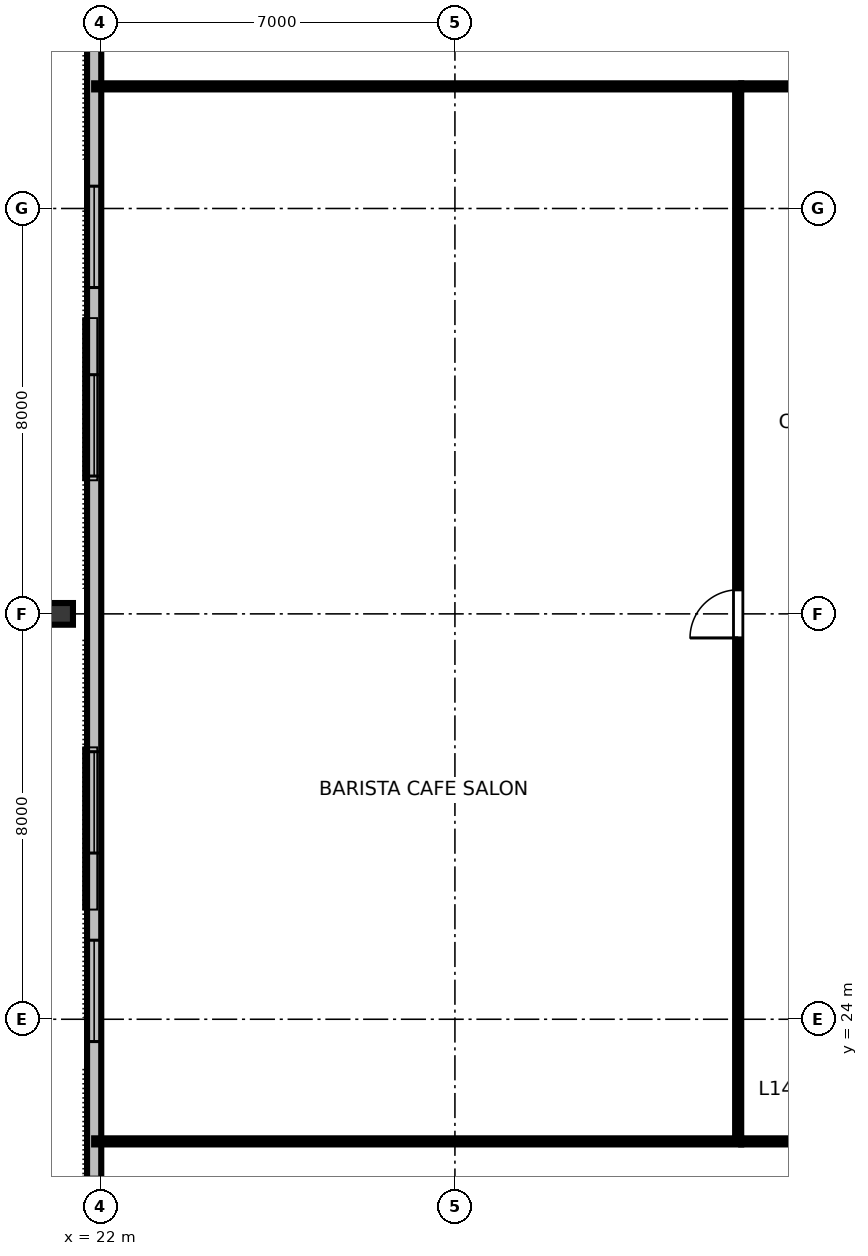
"""IFC4 building model, lengths in metres.
Left out: names, types, materials, properties, quantities, classifications, styles, units other than length and angle.
Written with IfcOpenShell. Run it as: python <this file> out.ifc"""

import sys

from ifc_helpers import new_model, si_unit, direction, frame, frame_2d, origin, origin_2d, place, context, subcontext, project, spatial, rectangle, i_section, extrude, element, fill, save


model = new_model("IFC4")
c1 = context("Model", 3, precision=1e-05, world=origin(), true_north=direction((0.0, 1.0)))
c2 = subcontext(c1, "Body", "Model", "MODEL_VIEW")
j1 = project(units=[si_unit("LENGTHUNIT", "METRE"), si_unit("PLANEANGLEUNIT", "RADIAN")], contexts=[c1])
p1 = place(None, origin())
s1 = spatial("IfcSite", under=j1, at=p1, CompositionType="ELEMENT")
p2 = place(p1, origin())
s2 = spatial("IfcBuilding", under=s1, at=p2, CompositionType="ELEMENT")
p3 = place(p2, frame((0.0, 0.0, 56.8)))
s3 = spatial("IfcBuildingStorey", under=s2, at=p3, CompositionType="ELEMENT", Elevation=56.8)
p4 = place(p3, frame((21.22, 32.0, 0.0), z_axis=(-0.103626949617, 0.0, 0.994616235195), x_axis=(0.994616235195, 0.0, 0.103626949617)))
e1 = element("IfcColumn", 1, at=p4, inside=s3, PredefinedType="COLUMN", context=c2, shape_type="SweptSolid", body=[
    extrude(i_section(OverallWidth=0.428, OverallDepth=0.483, WebThickness=0.051, FlangeThickness=0.082, FilletRadius=0.025, at=origin_2d()), origin(), (0.0, 0.0, 1.0), 3.376),
])
p5 = place(p3, frame((21.88, 49.84, 0.0), z_axis=(0.0, 0.0, 1.0), x_axis=(0.0, -1.0, 0.0)))
e2 = element("IfcWall", 2, at=p5, inside=s3, PredefinedType="STANDARD", context=c2, shape_type="SweptSolid", body=[
    extrude(rectangle(XDim=35.68, YDim=0.28, at=frame_2d((17.84, 0.0))), origin(), (0.0, 0.0, 1.0), 3.36),
])
p6 = place(p5, frame((1.96, 0.0, 0.8)))
e3 = element("IfcOpeningElement", 3, at=p6, cuts=e2, PredefinedType="OPENING", context=c2, shape_type="SweptSolid", body=[
    extrude(rectangle(XDim=2.0, YDim=1.95, at=frame_2d((1.0, 0.975))), frame((0.0, 0.15, 0.0), z_axis=(0.0, -1.0, 0.0), x_axis=(1.0, 0.0, 0.0)), (0.0, 0.0, 1.0), 0.3),
])
p7 = place(p5, frame((9.4, 0.0, 0.8)))
e4 = element("IfcOpeningElement", 4, at=p7, cuts=e2, PredefinedType="OPENING", context=c2, shape_type="SweptSolid", body=[
    extrude(rectangle(XDim=2.0, YDim=1.95, at=frame_2d((1.0, 0.975))), frame((0.0, 0.15, 0.0), z_axis=(0.0, -1.0, 0.0), x_axis=(1.0, 0.0, 0.0)), (0.0, 0.0, 1.0), 0.3),
])
p8 = place(p5, frame((13.12, 0.0, 0.8)))
e5 = element("IfcOpeningElement", 5, at=p8, cuts=e2, PredefinedType="OPENING", context=c2, shape_type="SweptSolid", body=[
    extrude(rectangle(XDim=2.0, YDim=1.95, at=frame_2d((1.0, 0.975))), frame((0.0, 0.15, 0.0), z_axis=(0.0, -1.0, 0.0), x_axis=(1.0, 0.0, 0.0)), (0.0, 0.0, 1.0), 0.3),
])
p9 = place(p5, frame((20.56, 0.0, 0.8)))
e6 = element("IfcOpeningElement", 6, at=p9, cuts=e2, PredefinedType="OPENING", context=c2, shape_type="SweptSolid", body=[
    extrude(rectangle(XDim=2.0, YDim=1.95, at=frame_2d((1.0, 0.975))), frame((0.0, 0.15, 0.0), z_axis=(0.0, -1.0, 0.0), x_axis=(1.0, 0.0, 0.0)), (0.0, 0.0, 1.0), 0.3),
])
p10 = place(p5, frame((24.28, 0.0, 0.8)))
e7 = element("IfcOpeningElement", 7, at=p10, cuts=e2, PredefinedType="OPENING", context=c2, shape_type="SweptSolid", body=[
    extrude(rectangle(XDim=2.0, YDim=1.95, at=frame_2d((1.0, 0.975))), frame((0.0, 0.15, 0.0), z_axis=(0.0, -1.0, 0.0), x_axis=(1.0, 0.0, 0.0)), (0.0, 0.0, 1.0), 0.3),
])
p11 = place(p5, frame((31.72, 0.0, 0.8)))
e8 = element("IfcOpeningElement", 8, at=p11, cuts=e2, PredefinedType="OPENING", context=c2, shape_type="SweptSolid", body=[
    extrude(rectangle(XDim=2.0, YDim=1.95, at=frame_2d((1.0, 0.975))), frame((0.0, 0.15, 0.0), z_axis=(0.0, -1.0, 0.0), x_axis=(1.0, 0.0, 0.0)), (0.0, 0.0, 1.0), 0.3),
])
p12 = place(p3, frame((34.65, 21.59, 0.0), z_axis=(0.0, 0.0, 1.0), x_axis=(1.0, 0.0, 0.0)))
e9 = element("IfcWall", 9, at=p12, inside=s3, PredefinedType="PARTITIONING", context=c2, shape_type="SweptSolid", body=[
    extrude(rectangle(XDim=22.7, YDim=0.12, at=frame_2d((11.35, 0.0))), origin(), (0.0, 0.0, 1.0), 2.64),
])
p13 = place(p12, frame((2.045, 0.0, 0.0)))
e10 = element("IfcOpeningElement", 10, at=p13, cuts=e9, PredefinedType="OPENING", context=c2, shape_type="SweptSolid", body=[
    extrude(rectangle(XDim=0.95, YDim=2.15, at=frame_2d((0.475, 1.075))), frame((0.0, 0.07, 0.0), z_axis=(0.0, -1.0, 0.0), x_axis=(1.0, 0.0, 0.0)), (0.0, 0.0, 1.0), 0.14),
])
p14 = place(p12, frame((7.126, 0.0, 0.0)))
e11 = element("IfcOpeningElement", 11, at=p14, cuts=e9, PredefinedType="OPENING", context=c2, shape_type="SweptSolid", body=[
    extrude(rectangle(XDim=0.95, YDim=2.15, at=frame_2d((0.475, 1.075))), frame((0.0, 0.07, 0.0), z_axis=(0.0, -1.0, 0.0), x_axis=(1.0, 0.0, 0.0)), (0.0, 0.0, 1.0), 0.14),
])
p15 = place(p12, frame((11.509, 0.0, 0.0)))
e12 = element("IfcOpeningElement", 12, at=p15, cuts=e9, PredefinedType="OPENING", context=c2, shape_type="SweptSolid", body=[
    extrude(rectangle(XDim=0.95, YDim=2.15, at=frame_2d((0.475, 1.075))), frame((0.0, 0.07, 0.0), z_axis=(0.0, -1.0, 0.0), x_axis=(1.0, 0.0, 0.0)), (0.0, 0.0, 1.0), 0.14),
])
p16 = place(p12, frame((17.638, 0.0, 0.0)))
e13 = element("IfcOpeningElement", 13, at=p16, cuts=e9, PredefinedType="OPENING", context=c2, shape_type="SweptSolid", body=[
    extrude(rectangle(XDim=0.95, YDim=2.15, at=frame_2d((0.475, 1.075))), frame((0.0, 0.07, 0.0), z_axis=(0.0, -1.0, 0.0), x_axis=(1.0, 0.0, 0.0)), (0.0, 0.0, 1.0), 0.14),
])
p17 = place(p3, frame((34.65, 42.41, 0.0), z_axis=(0.0, 0.0, 1.0), x_axis=(1.0, 0.0, 0.0)))
e14 = element("IfcWall", 14, at=p17, inside=s3, PredefinedType="PARTITIONING", context=c2, shape_type="SweptSolid", body=[
    extrude(rectangle(XDim=22.7, YDim=0.12, at=frame_2d((11.35, 0.0))), origin(), (0.0, 0.0, 1.0), 2.64),
])
p18 = place(p17, frame((5.745, 0.0, 0.0)))
e15 = element("IfcOpeningElement", 15, at=p18, cuts=e14, PredefinedType="OPENING", context=c2, shape_type="SweptSolid", body=[
    extrude(rectangle(XDim=0.95, YDim=2.15, at=frame_2d((0.475, 1.075))), frame((0.0, 0.07, 0.0), z_axis=(0.0, -1.0, 0.0), x_axis=(1.0, 0.0, 0.0)), (0.0, 0.0, 1.0), 0.14),
])
p19 = place(p17, frame((16.955, 0.0, 0.0)))
e16 = element("IfcOpeningElement", 16, at=p19, cuts=e14, PredefinedType="OPENING", context=c2, shape_type="SweptSolid", body=[
    extrude(rectangle(XDim=0.95, YDim=2.15, at=frame_2d((0.475, 1.075))), frame((0.0, 0.07, 0.0), z_axis=(0.0, -1.0, 0.0), x_axis=(1.0, 0.0, 0.0)), (0.0, 0.0, 1.0), 0.14),
])
p20 = place(p3, frame((34.59, 21.65, 0.0), z_axis=(0.0, 0.0, 1.0), x_axis=(0.0, 1.0, 0.0)))
e17 = element("IfcWall", 17, at=p20, inside=s3, PredefinedType="PARTITIONING", context=c2, shape_type="SweptSolid", body=[
    extrude(rectangle(XDim=20.7, YDim=0.12, at=frame_2d((10.35, 0.0))), origin(), (0.0, 0.0, 1.0), 2.64),
])
p21 = place(p20, frame((9.875, 0.0, 0.0)))
e18 = element("IfcOpeningElement", 18, at=p21, cuts=e17, PredefinedType="OPENING", context=c2, shape_type="SweptSolid", body=[
    extrude(rectangle(XDim=0.95, YDim=2.15, at=frame_2d((0.475, 1.075))), frame((0.0, 0.07, 0.0), z_axis=(0.0, -1.0, 0.0), x_axis=(1.0, 0.0, 0.0)), (0.0, 0.0, 1.0), 0.14),
])
for number, where, z_axis, x_axis in (
    (19, (34.65, 21.59, 0.0), (0.0, 0.0, 1.0), (-1.0, 0.0, 0.0)),
    (20, (34.65, 42.41, 0.0), (0.0, 0.0, 1.0), (-1.0, 0.0, 0.0)),
):
    element("IfcWall", number, at=place(p3, frame(where, z_axis=z_axis, x_axis=x_axis)), inside=s3, PredefinedType="PARTITIONING", context=c2, shape_type="SweptSolid", body=[
        extrude(rectangle(XDim=12.77, YDim=0.12, at=frame_2d((6.385, 0.0))), origin(), (0.0, 0.0, 1.0), 2.64),
    ])
p22 = place(p7, origin())
e21 = element("IfcWindow", 21, at=p22, inside=s3, PartitioningType="SINGLE_PANEL", PredefinedType="WINDOW", context=c2, shape_type="SweptSolid", body=[
    extrude(rectangle(XDim=2.0, YDim=1.95, at=frame_2d((1.0, 0.975))), frame((0.0, 0.03, 0.0), z_axis=(0.0, -1.0, 0.0), x_axis=(1.0, 0.0, 0.0)), (0.0, 0.0, 1.0), 0.06),
])
fill(e4, e21)
p23 = place(p8, origin())
e22 = element("IfcWindow", 22, at=p23, inside=s3, PartitioningType="SINGLE_PANEL", PredefinedType="WINDOW", context=c2, shape_type="SweptSolid", body=[
    extrude(rectangle(XDim=2.0, YDim=1.95, at=frame_2d((1.0, 0.975))), frame((0.0, 0.03, 0.0), z_axis=(0.0, -1.0, 0.0), x_axis=(1.0, 0.0, 0.0)), (0.0, 0.0, 1.0), 0.06),
])
fill(e5, e22)
p24 = place(p9, origin())
e23 = element("IfcWindow", 23, at=p24, inside=s3, PartitioningType="SINGLE_PANEL", PredefinedType="WINDOW", context=c2, shape_type="SweptSolid", body=[
    extrude(rectangle(XDim=2.0, YDim=1.95, at=frame_2d((1.0, 0.975))), frame((0.0, 0.03, 0.0), z_axis=(0.0, -1.0, 0.0), x_axis=(1.0, 0.0, 0.0)), (0.0, 0.0, 1.0), 0.06),
])
fill(e6, e23)
p25 = place(p10, origin())
e24 = element("IfcWindow", 24, at=p25, inside=s3, PartitioningType="SINGLE_PANEL", PredefinedType="WINDOW", context=c2, shape_type="SweptSolid", body=[
    extrude(rectangle(XDim=2.0, YDim=1.95, at=frame_2d((1.0, 0.975))), frame((0.0, 0.03, 0.0), z_axis=(0.0, -1.0, 0.0), x_axis=(1.0, 0.0, 0.0)), (0.0, 0.0, 1.0), 0.06),
])
fill(e7, e24)
p26 = place(p21, origin())
e25 = element("IfcDoor", 25, at=p26, inside=s3, OperationType="SINGLE_SWING_LEFT", PredefinedType="DOOR", context=c2, shape_type="SweptSolid", body=[
    extrude(rectangle(XDim=0.95, YDim=2.15, at=frame_2d((0.475, 1.075))), frame((0.0, 0.025, 0.0), z_axis=(0.0, -1.0, 0.0), x_axis=(1.0, 0.0, 0.0)), (0.0, 0.0, 1.0), 0.05),
])
fill(e18, e25)
save(model, sys.argv[1])
